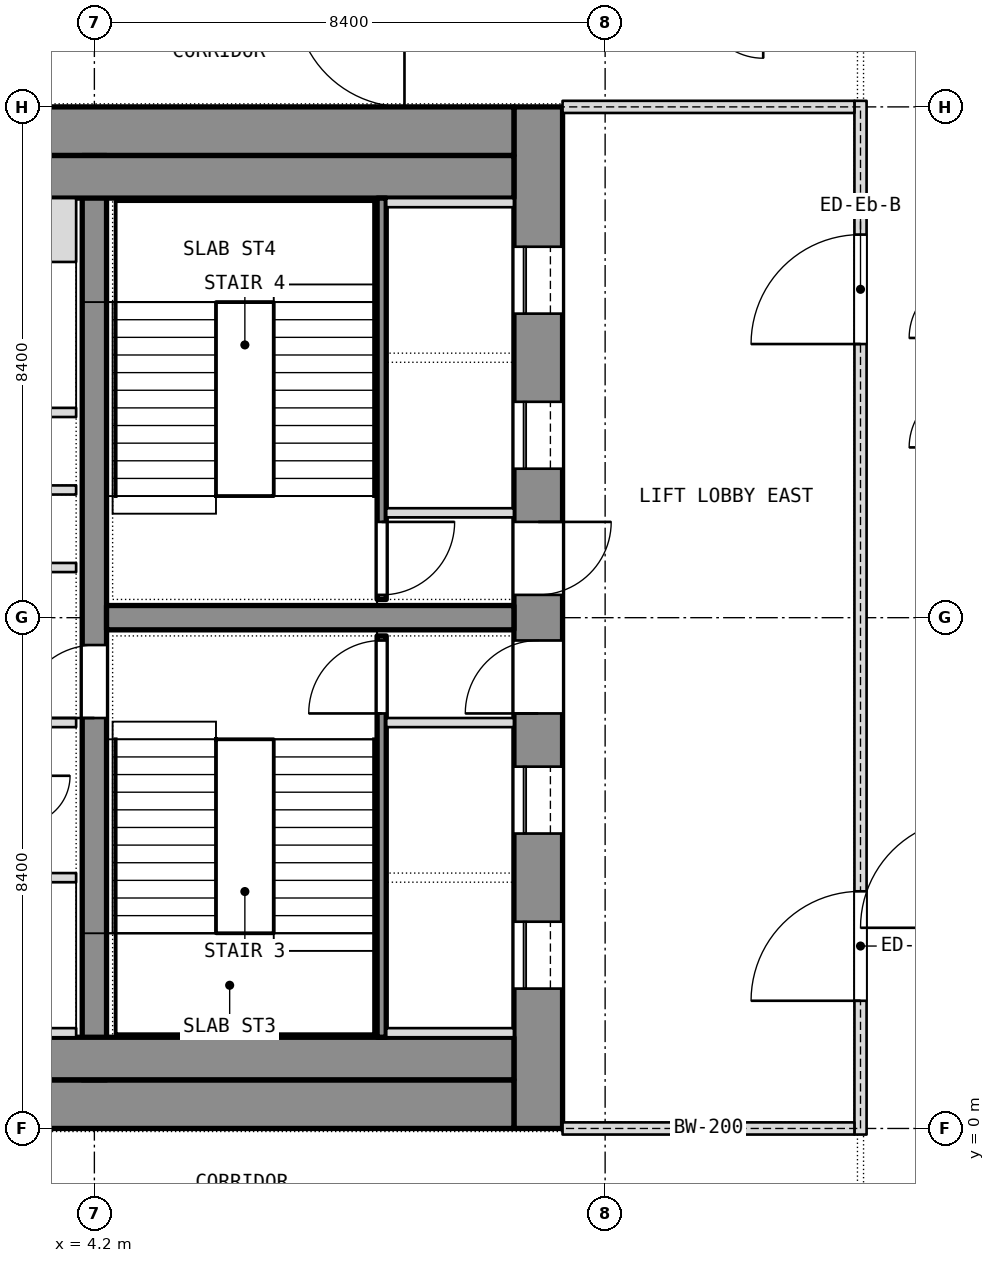
"""IFC4 building model, lengths in metres.
Left out: names, types, materials, properties, quantities, classifications, styles, units other than length and angle.
Written with IfcOpenShell. Run it as: python <this file> out.ifc"""

import sys

from ifc_helpers import new_model, si_unit, direction, frame, frame_2d, origin, place, context, subcontext, project, spatial, rectangle, extrude, element, fill, save


model = new_model("IFC4")
c1 = context("Model", 3, precision=1e-05, world=origin(), true_north=direction((0.0, 1.0)))
c2 = subcontext(c1, "Body", "Model", "MODEL_VIEW")
j1 = project(units=[si_unit("LENGTHUNIT", "METRE"), si_unit("PLANEANGLEUNIT", "RADIAN")], contexts=[c1])
p1 = place(None, origin())
s1 = spatial("IfcSite", under=j1, at=p1, CompositionType="ELEMENT")
p2 = place(p1, origin())
s2 = spatial("IfcBuilding", under=s1, at=p2, CompositionType="ELEMENT")
p3 = place(p2, frame((0.0, 0.0, 205.7)))
s3 = spatial("IfcBuildingStorey", under=s2, at=p3, CompositionType="ELEMENT", Elevation=205.7)
p4 = place(p3, frame((11.5, 0.0, 0.0), z_axis=(0.0, 0.0, 1.0), x_axis=(0.0, 1.0, 0.0)))
e1 = element("IfcWall", 1, at=p4, inside=s3, PredefinedType="SHEAR", context=c2, shape_type="SweptSolid", body=[
    extrude(rectangle(XDim=16.8, YDim=0.8, at=frame_2d((8.4, 0.0))), origin(), (0.0, 0.0, 1.0), 3.6),
])
p5 = place(p4, frame((2.3, 0.0, 0.0)))
e2 = element("IfcOpeningElement", 2, at=p5, cuts=e1, PredefinedType="OPENING", context=c2, shape_type="SweptSolid", body=[
    extrude(rectangle(XDim=1.1, YDim=2.1, at=frame_2d((0.55, 1.05))), frame((0.0, 0.4, 0.0), z_axis=(0.0, -1.0, 0.0), x_axis=(1.0, 0.0, 0.0)), (0.0, 0.0, 1.0), 0.8),
])
p6 = place(p4, frame((4.85, 0.0, 0.0)))
e3 = element("IfcOpeningElement", 3, at=p6, cuts=e1, PredefinedType="OPENING", context=c2, shape_type="SweptSolid", body=[
    extrude(rectangle(XDim=1.1, YDim=2.1, at=frame_2d((0.55, 1.05))), frame((0.0, 0.4, 0.0), z_axis=(0.0, -1.0, 0.0), x_axis=(1.0, 0.0, 0.0)), (0.0, 0.0, 1.0), 0.8),
])
p7 = place(p4, frame((6.825, 0.0, 0.0)))
e4 = element("IfcOpeningElement", 4, at=p7, cuts=e1, PredefinedType="OPENING", context=c2, shape_type="SweptSolid", body=[
    extrude(rectangle(XDim=1.2, YDim=2.1, at=frame_2d((0.6, 1.05))), frame((0.0, 0.4, 0.0), z_axis=(0.0, -1.0, 0.0), x_axis=(1.0, 0.0, 0.0)), (0.0, 0.0, 1.0), 0.8),
])
p8 = place(p4, frame((13.4, 0.0, 0.0)))
e5 = element("IfcOpeningElement", 5, at=p8, cuts=e1, PredefinedType="OPENING", context=c2, shape_type="SweptSolid", body=[
    extrude(rectangle(XDim=1.1, YDim=2.1, at=frame_2d((0.55, 1.05))), frame((0.0, 0.4, 0.0), z_axis=(0.0, -1.0, 0.0), x_axis=(1.0, 0.0, 0.0)), (0.0, 0.0, 1.0), 0.8),
])
p9 = place(p4, frame((10.85, 0.0, 0.0)))
e6 = element("IfcOpeningElement", 6, at=p9, cuts=e1, PredefinedType="OPENING", context=c2, shape_type="SweptSolid", body=[
    extrude(rectangle(XDim=1.1, YDim=2.1, at=frame_2d((0.55, 1.05))), frame((0.0, 0.4, 0.0), z_axis=(0.0, -1.0, 0.0), x_axis=(1.0, 0.0, 0.0)), (0.0, 0.0, 1.0), 0.8),
])
p10 = place(p4, frame((8.775, 0.0, 0.0)))
e7 = element("IfcOpeningElement", 7, at=p10, cuts=e1, PredefinedType="OPENING", context=c2, shape_type="SweptSolid", body=[
    extrude(rectangle(XDim=1.2, YDim=2.1, at=frame_2d((0.6, 1.05))), frame((0.0, 0.4, 0.0), z_axis=(0.0, -1.0, 0.0), x_axis=(1.0, 0.0, 0.0)), (0.0, 0.0, 1.0), 0.8),
])
for number, where, z_axis, x_axis in (
    (8, (-11.1, 0.4, 0.0), (0.0, 0.0, 1.0), (1.0, 0.0, 0.0)),
    (9, (-11.1, 16.4, 0.0), (0.0, 0.0, 1.0), (1.0, 0.0, 0.0)),
):
    element("IfcWall", number, at=place(p3, frame(where, z_axis=z_axis, x_axis=x_axis)), inside=s3, PredefinedType="SHEAR", context=c2, shape_type="SweptSolid", body=[
        extrude(rectangle(XDim=22.2, YDim=0.8, at=frame_2d((11.1, 0.0))), origin(), (0.0, 0.0, 1.0), 3.6),
    ])
p11 = place(p3, frame((4.2, 0.8, 0.0), z_axis=(0.0, 0.0, 1.0), x_axis=(0.0, 1.0, 0.0)))
e10 = element("IfcWall", 10, at=p11, inside=s3, PredefinedType="SHEAR", context=c2, shape_type="SweptSolid", body=[
    extrude(rectangle(XDim=15.2, YDim=0.4, at=frame_2d((7.6, 0.0))), origin(), (0.0, 0.0, 1.0), 3.6),
])
p12 = place(p11, frame((5.95, 0.0, 0.0)))
e11 = element("IfcOpeningElement", 11, at=p12, cuts=e10, PredefinedType="OPENING", context=c2, shape_type="SweptSolid", body=[
    extrude(rectangle(XDim=1.2, YDim=2.1, at=frame_2d((0.6, 1.05))), frame((0.0, 0.2, 0.0), z_axis=(0.0, -1.0, 0.0), x_axis=(1.0, 0.0, 0.0)), (0.0, 0.0, 1.0), 0.4),
])
p13 = place(p3, frame((4.4, 8.4, 0.0), z_axis=(0.0, 0.0, 1.0), x_axis=(1.0, 0.0, 0.0)))
e12 = element("IfcWall", 12, at=p13, inside=s3, PredefinedType="SHEAR", context=c2, shape_type="SweptSolid", body=[
    extrude(rectangle(XDim=6.7, YDim=0.4, at=frame_2d((3.35, 0.0))), origin(), (0.0, 0.0, 1.0), 3.6),
])
for number, where, z_axis, x_axis in (
    (13, (-11.1, 1.15, 0.0), (0.0, 0.0, 1.0), (1.0, 0.0, 0.0)),
    (14, (-11.1, 15.65, 0.0), (0.0, 0.0, 1.0), (1.0, 0.0, 0.0)),
):
    element("IfcWall", number, at=place(p3, frame(where, z_axis=z_axis, x_axis=x_axis)), inside=s3, PredefinedType="PARTITIONING", context=c2, shape_type="SweptSolid", body=[
        extrude(rectangle(XDim=22.2, YDim=0.7, at=frame_2d((11.1, 0.0))), origin(), (0.0, 0.0, 1.0), 3.34),
    ])
p14 = place(p3, frame((8.925, 1.5, 0.0), z_axis=(0.0, 0.0, 1.0), x_axis=(0.0, 1.0, 0.0)))
e15 = element("IfcWall", 15, at=p14, inside=s3, PredefinedType="SHEAR", context=c2, shape_type="SweptSolid", body=[
    extrude(rectangle(XDim=6.6, YDim=0.15, at=frame_2d((3.3, 0.0))), origin(), (0.0, 0.0, 1.0), 3.34),
])
p15 = place(p14, frame((5.325, 0.0, 0.0)))
e16 = element("IfcOpeningElement", 16, at=p15, cuts=e15, PredefinedType="OPENING", context=c2, shape_type="SweptSolid", body=[
    extrude(rectangle(XDim=1.2, YDim=2.1, at=frame_2d((0.6, 1.05))), frame((0.0, 0.075, 0.0), z_axis=(0.0, -1.0, 0.0), x_axis=(1.0, 0.0, 0.0)), (0.0, 0.0, 1.0), 0.15),
])
for number, where, z_axis, x_axis in (
    (17, (9.0, 6.675, 0.0), (0.0, 0.0, 1.0), (1.0, 0.0, 0.0)),
    (18, (9.0, 1.575, 0.0), (0.0, 0.0, 1.0), (1.0, 0.0, 0.0)),
):
    element("IfcWall", number, at=place(p3, frame(where, z_axis=z_axis, x_axis=x_axis)), inside=s3, PredefinedType="SHEAR", context=c2, shape_type="SweptSolid", body=[
        extrude(rectangle(XDim=2.1, YDim=0.15, at=frame_2d((1.05, 0.0))), origin(), (0.0, 0.0, 1.0), 3.6),
    ])
p16 = place(p3, frame((8.925, 8.7, 0.0), z_axis=(0.0, 0.0, 1.0), x_axis=(0.0, 1.0, 0.0)))
e19 = element("IfcWall", 19, at=p16, inside=s3, PredefinedType="SHEAR", context=c2, shape_type="SweptSolid", body=[
    extrude(rectangle(XDim=6.6, YDim=0.15, at=frame_2d((3.3, 0.0))), origin(), (0.0, 0.0, 1.0), 3.34),
])
p17 = place(p16, frame((0.075, 0.0, 0.0)))
e20 = element("IfcOpeningElement", 20, at=p17, cuts=e19, PredefinedType="OPENING", context=c2, shape_type="SweptSolid", body=[
    extrude(rectangle(XDim=1.2, YDim=2.1, at=frame_2d((0.6, 1.05))), frame((0.0, 0.075, 0.0), z_axis=(0.0, -1.0, 0.0), x_axis=(1.0, 0.0, 0.0)), (0.0, 0.0, 1.0), 0.15),
])
for number, where, z_axis, x_axis in (
    (21, (9.0, 10.125, 0.0), (0.0, 0.0, 1.0), (1.0, 0.0, 0.0)),
    (22, (9.0, 15.225, 0.0), (0.0, 0.0, 1.0), (1.0, 0.0, 0.0)),
):
    element("IfcWall", number, at=place(p3, frame(where, z_axis=z_axis, x_axis=x_axis)), inside=s3, PredefinedType="SHEAR", context=c2, shape_type="SweptSolid", body=[
        extrude(rectangle(XDim=2.1, YDim=0.15, at=frame_2d((1.05, 0.0))), origin(), (0.0, 0.0, 1.0), 3.6),
    ])
p18 = place(p3, frame((-3.9, 4.125, 0.0), z_axis=(0.0, 0.0, 1.0), x_axis=(1.0, 0.0, 0.0)))
e23 = element("IfcWall", 23, at=p18, inside=s3, PredefinedType="PARTITIONING", context=c2, shape_type="SweptSolid", body=[
    extrude(rectangle(XDim=7.8, YDim=0.15, at=frame_2d((3.9, 0.0))), origin(), (0.0, 0.0, 1.0), 3.34),
])
p19 = place(p18, frame((3.75, 0.0, 0.0)))
e24 = element("IfcOpeningElement", 24, at=p19, cuts=e23, PredefinedType="OPENING", context=c2, shape_type="SweptSolid", body=[
    extrude(rectangle(XDim=1.2, YDim=2.1, at=frame_2d((0.6, 1.05))), frame((0.0, 0.075, 0.0), z_axis=(0.0, -1.0, 0.0), x_axis=(1.0, 0.0, 0.0)), (0.0, 0.0, 1.0), 0.15),
])
p20 = place(p3, frame((-3.9, 11.775, 0.0), z_axis=(0.0, 0.0, 1.0), x_axis=(1.0, 0.0, 0.0)))
e25 = element("IfcWall", 25, at=p20, inside=s3, PredefinedType="PARTITIONING", context=c2, shape_type="SweptSolid", body=[
    extrude(rectangle(XDim=7.8, YDim=0.15, at=frame_2d((3.9, 0.0))), origin(), (0.0, 0.0, 1.0), 3.34),
])
p21 = place(p20, frame((3.3, 0.0, 0.0)))
e26 = element("IfcOpeningElement", 26, at=p21, cuts=e25, PredefinedType="OPENING", context=c2, shape_type="SweptSolid", body=[
    extrude(rectangle(XDim=1.2, YDim=2.1, at=frame_2d((0.6, 1.05))), frame((0.0, 0.075, 0.0), z_axis=(0.0, -1.0, 0.0), x_axis=(1.0, 0.0, 0.0)), (0.0, 0.0, 1.0), 0.15),
])
p22 = place(p3, frame((1.65, 1.575, 0.0), z_axis=(0.0, 0.0, 1.0), x_axis=(1.0, 0.0, 0.0)))
e27 = element("IfcWall", 27, at=p22, inside=s3, PredefinedType="SHEAR", context=c2, shape_type="SweptSolid", body=[
    extrude(rectangle(XDim=2.25, YDim=0.15, at=frame_2d((1.125, 0.0))), origin(), (0.0, 0.0, 1.0), 3.6),
])
p23 = place(p3, frame((1.65, 14.775, 0.0), z_axis=(0.0, 0.0, 1.0), x_axis=(1.0, 0.0, 0.0)))
e28 = element("IfcWall", 28, at=p23, inside=s3, PredefinedType="SHEAR", context=c2, shape_type="SweptSolid", body=[
    extrude(rectangle(XDim=2.25, YDim=1.05, at=frame_2d((1.125, 0.0))), origin(), (0.0, 0.0, 1.0), 3.6),
])
for number, where, z_axis, x_axis in (
    (29, (1.65, 6.675, 0.0), (0.0, 0.0, 1.0), (1.0, 0.0, 0.0)),
    (30, (1.65, 9.225, 0.0), (0.0, 0.0, 1.0), (1.0, 0.0, 0.0)),
):
    element("IfcWall", number, at=place(p3, frame(where, z_axis=z_axis, x_axis=x_axis)), inside=s3, PredefinedType="PARTITIONING", context=c2, shape_type="SweptSolid", body=[
        extrude(rectangle(XDim=2.25, YDim=0.15, at=frame_2d((1.125, 0.0))), origin(), (0.0, 0.0, 1.0), 3.34),
    ])
p24 = place(p3, frame((1.8, 10.5, 0.0), z_axis=(0.0, 0.0, 1.0), x_axis=(1.0, 0.0, 0.0)))
e31 = element("IfcWall", 31, at=p24, inside=s3, PredefinedType="PARTITIONING", context=c2, shape_type="SweptSolid", body=[
    extrude(rectangle(XDim=2.1, YDim=0.15, at=frame_2d((1.05, 0.0))), origin(), (0.0, 0.0, 1.0), 3.34),
])
p25 = place(p3, frame((16.8, -0.1, 0.0), z_axis=(0.0, 0.0, 1.0), x_axis=(0.0, 1.0, 0.0)))
e32 = element("IfcWall", 32, at=p25, inside=s3, PredefinedType="PARTITIONING", context=c2, shape_type="SweptSolid", body=[
    extrude(rectangle(XDim=17.0, YDim=0.2, at=frame_2d((8.5, 0.0))), origin(), (0.0, 0.0, 1.0), 3.34),
])
p26 = place(p25, frame((2.2, 0.0, 0.0)))
e33 = element("IfcOpeningElement", 33, at=p26, cuts=e32, PredefinedType="OPENING", context=c2, shape_type="SweptSolid", body=[
    extrude(rectangle(XDim=1.8, YDim=2.1, at=frame_2d((0.9, 1.05))), frame((0.0, 0.1, 0.0), z_axis=(0.0, -1.0, 0.0), x_axis=(1.0, 0.0, 0.0)), (0.0, 0.0, 1.0), 0.2),
])
p27 = place(p25, frame((13.0, 0.0, 0.0)))
e34 = element("IfcOpeningElement", 34, at=p27, cuts=e32, PredefinedType="OPENING", context=c2, shape_type="SweptSolid", body=[
    extrude(rectangle(XDim=1.8, YDim=2.1, at=frame_2d((0.9, 1.05))), frame((0.0, 0.1, 0.0), z_axis=(0.0, -1.0, 0.0), x_axis=(1.0, 0.0, 0.0)), (0.0, 0.0, 1.0), 0.2),
])
for number, where, z_axis, x_axis in (
    (35, (11.9, 0.0, 0.0), (0.0, 0.0, 1.0), (1.0, 0.0, 0.0)),
    (36, (11.9, 16.8, 0.0), (0.0, 0.0, 1.0), (1.0, 0.0, 0.0)),
):
    element("IfcWall", number, at=place(p3, frame(where, z_axis=z_axis, x_axis=x_axis)), inside=s3, PredefinedType="PARTITIONING", context=c2, shape_type="SweptSolid", body=[
        extrude(rectangle(XDim=4.8, YDim=0.2, at=frame_2d((2.4, 0.0))), origin(), (0.0, 0.0, 1.0), 2.94),
    ])
p28 = place(p5, origin())
e37 = element("IfcDoor", 37, at=p28, inside=s3, OperationType="SLIDING_TO_LEFT", PredefinedType="DOOR", context=c2, shape_type="SweptSolid", body=[
    extrude(rectangle(XDim=1.1, YDim=2.1, at=frame_2d((0.55, 1.05))), frame((0.0, 0.025, 0.0), z_axis=(0.0, -1.0, 0.0), x_axis=(1.0, 0.0, 0.0)), (0.0, 0.0, 1.0), 0.05),
])
fill(e2, e37)
p29 = place(p6, origin())
e38 = element("IfcDoor", 38, at=p29, inside=s3, OperationType="SLIDING_TO_LEFT", PredefinedType="DOOR", context=c2, shape_type="SweptSolid", body=[
    extrude(rectangle(XDim=1.1, YDim=2.1, at=frame_2d((0.55, 1.05))), frame((0.0, 0.025, 0.0), z_axis=(0.0, -1.0, 0.0), x_axis=(1.0, 0.0, 0.0)), (0.0, 0.0, 1.0), 0.05),
])
fill(e3, e38)
p30 = place(p7, origin())
e39 = element("IfcDoor", 39, at=p30, inside=s3, OperationType="SINGLE_SWING_LEFT", PredefinedType="DOOR", context=c2, shape_type="SweptSolid", body=[
    extrude(rectangle(XDim=1.2, YDim=2.1, at=frame_2d((0.6, 1.05))), frame((0.0, 0.025, 0.0), z_axis=(0.0, -1.0, 0.0), x_axis=(1.0, 0.0, 0.0)), (0.0, 0.0, 1.0), 0.05),
])
fill(e4, e39)
p31 = place(p15, origin())
e40 = element("IfcDoor", 40, at=p31, inside=s3, OperationType="SINGLE_SWING_LEFT", PredefinedType="DOOR", context=c2, shape_type="SweptSolid", body=[
    extrude(rectangle(XDim=1.2, YDim=2.1, at=frame_2d((0.6, 1.05))), frame((0.0, 0.025, 0.0), z_axis=(0.0, -1.0, 0.0), x_axis=(1.0, 0.0, 0.0)), (0.0, 0.0, 1.0), 0.05),
])
fill(e16, e40)
p32 = place(p8, origin())
e41 = element("IfcDoor", 41, at=p32, inside=s3, OperationType="SLIDING_TO_LEFT", PredefinedType="DOOR", context=c2, shape_type="SweptSolid", body=[
    extrude(rectangle(XDim=1.1, YDim=2.1, at=frame_2d((0.55, 1.05))), frame((0.0, 0.025, 0.0), z_axis=(0.0, -1.0, 0.0), x_axis=(1.0, 0.0, 0.0)), (0.0, 0.0, 1.0), 0.05),
])
fill(e5, e41)
p33 = place(p9, origin())
e42 = element("IfcDoor", 42, at=p33, inside=s3, OperationType="SLIDING_TO_LEFT", PredefinedType="DOOR", context=c2, shape_type="SweptSolid", body=[
    extrude(rectangle(XDim=1.1, YDim=2.1, at=frame_2d((0.55, 1.05))), frame((0.0, 0.025, 0.0), z_axis=(0.0, -1.0, 0.0), x_axis=(1.0, 0.0, 0.0)), (0.0, 0.0, 1.0), 0.05),
])
fill(e6, e42)
p34 = place(p10, origin())
e43 = element("IfcDoor", 43, at=p34, inside=s3, OperationType="SINGLE_SWING_LEFT", PredefinedType="DOOR", context=c2, shape_type="SweptSolid", body=[
    extrude(rectangle(XDim=1.2, YDim=2.1, at=frame_2d((0.6, 1.05))), frame((0.0, 0.025, 0.0), z_axis=(0.0, -1.0, 0.0), x_axis=(1.0, 0.0, 0.0)), (0.0, 0.0, 1.0), 0.05),
])
fill(e7, e43)
p35 = place(p17, origin())
e44 = element("IfcDoor", 44, at=p35, inside=s3, OperationType="SINGLE_SWING_LEFT", PredefinedType="DOOR", context=c2, shape_type="SweptSolid", body=[
    extrude(rectangle(XDim=1.2, YDim=2.1, at=frame_2d((0.6, 1.05))), frame((0.0, 0.025, 0.0), z_axis=(0.0, -1.0, 0.0), x_axis=(1.0, 0.0, 0.0)), (0.0, 0.0, 1.0), 0.05),
])
fill(e20, e44)
p36 = place(p12, origin())
e45 = element("IfcDoor", 45, at=p36, inside=s3, OperationType="SINGLE_SWING_LEFT", PredefinedType="DOOR", context=c2, shape_type="SweptSolid", body=[
    extrude(rectangle(XDim=1.2, YDim=2.1, at=frame_2d((0.6, 1.05))), frame((0.0, 0.025, 0.0), z_axis=(0.0, -1.0, 0.0), x_axis=(1.0, 0.0, 0.0)), (0.0, 0.0, 1.0), 0.05),
])
fill(e11, e45)
p37 = place(p26, origin())
e46 = element("IfcDoor", 46, at=p37, inside=s3, OperationType="DOUBLE_DOOR_SINGLE_SWING", PredefinedType="DOOR", context=c2, shape_type="SweptSolid", body=[
    extrude(rectangle(XDim=1.8, YDim=2.1, at=frame_2d((0.9, 1.05))), frame((0.0, 0.025, 0.0), z_axis=(0.0, -1.0, 0.0), x_axis=(1.0, 0.0, 0.0)), (0.0, 0.0, 1.0), 0.05),
])
fill(e33, e46)
p38 = place(p27, origin())
e47 = element("IfcDoor", 47, at=p38, inside=s3, OperationType="DOUBLE_DOOR_SINGLE_SWING", PredefinedType="DOOR", context=c2, shape_type="SweptSolid", body=[
    extrude(rectangle(XDim=1.8, YDim=2.1, at=frame_2d((0.9, 1.05))), frame((0.0, 0.025, 0.0), z_axis=(0.0, -1.0, 0.0), x_axis=(1.0, 0.0, 0.0)), (0.0, 0.0, 1.0), 0.05),
])
fill(e34, e47)
save(model, sys.argv[1])
